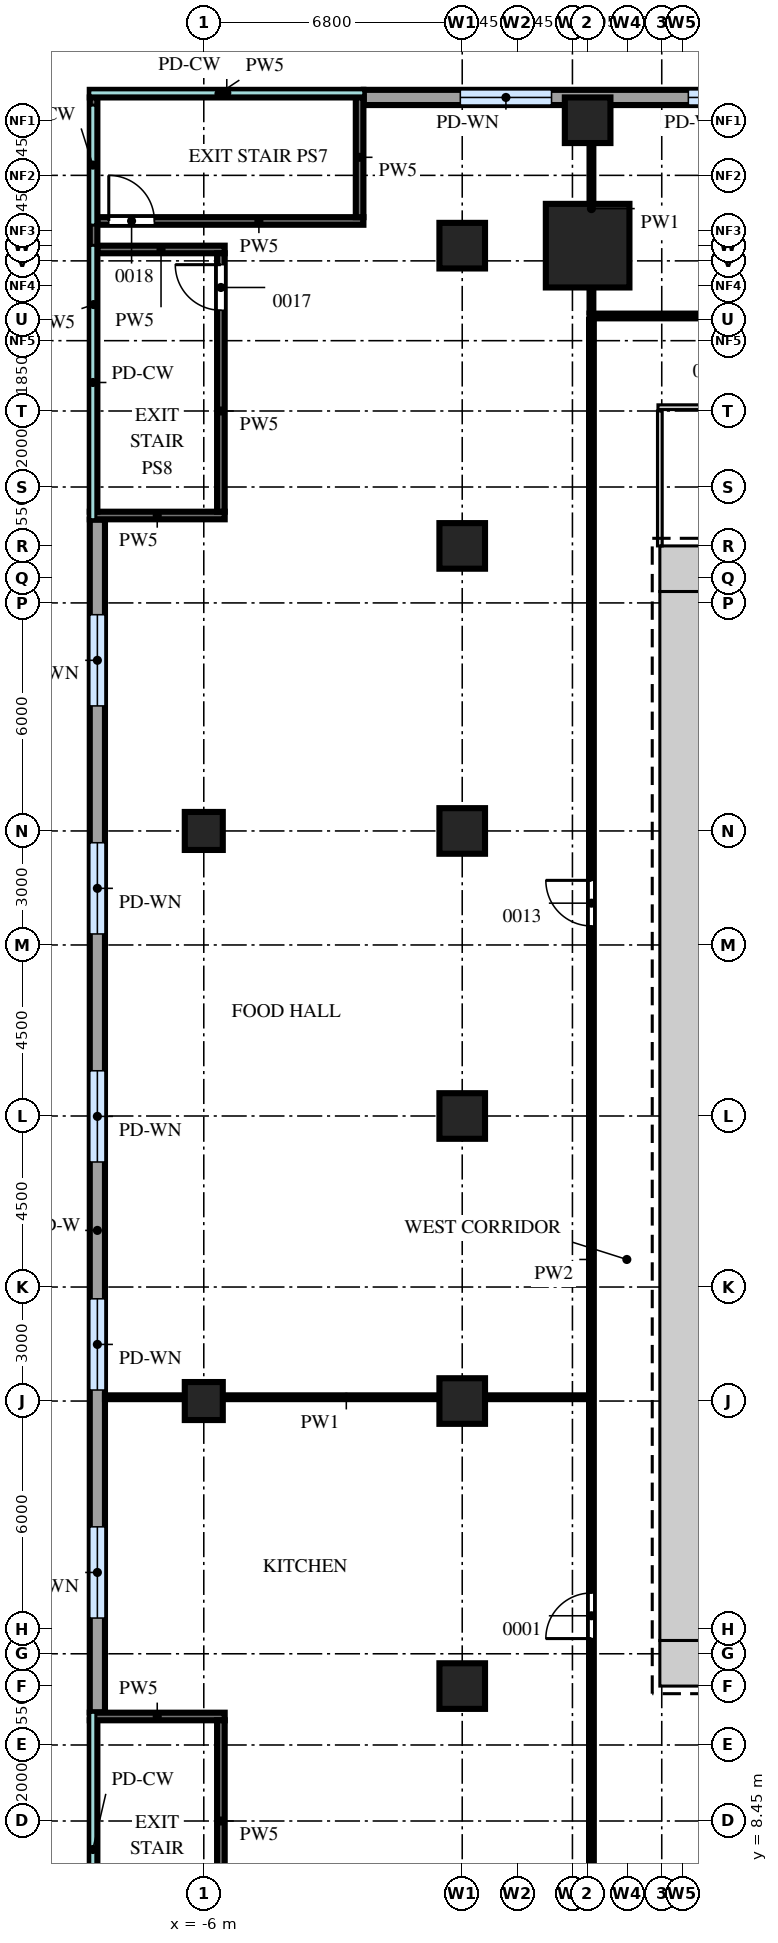
"""IFC4 building model, lengths in metres.
Left out: names, types, materials, properties, quantities, classifications, styles, units other than length and angle.
Written with IfcOpenShell. Run it as: python <this file> out.ifc"""

import sys

from ifc_helpers import new_model, si_unit, direction, frame, frame_2d, origin, origin_2d, place, context, subcontext, project, spatial, rectangle, extrude, source, transform, mapped, element, fill, save


model = new_model("IFC4")
c1 = context("Model", 3, precision=1e-05, world=origin(), true_north=direction((0.0, 1.0)))
c2 = subcontext(c1, "Body", "Model", "MODEL_VIEW")
j1 = project(units=[si_unit("LENGTHUNIT", "METRE"), si_unit("PLANEANGLEUNIT", "RADIAN")], contexts=[c1])
p1 = place(None, origin())
s1 = spatial("IfcSite", under=j1, at=p1, CompositionType="ELEMENT")
p2 = place(p1, origin())
s2 = spatial("IfcBuilding", under=s1, at=p2, CompositionType="ELEMENT")
p3 = place(p2, frame((0.0, 0.0, 13.0)))
s3 = spatial("IfcBuildingStorey", under=s2, at=p3, CompositionType="ELEMENT", Elevation=13.0)
m1 = source(origin(), c2, "Body", "SweptSolid", [
    extrude(rectangle(XDim=1.2, YDim=1.2, at=frame_2d((0.6, 0.0))), origin(), (0.0, 0.0, 1.0), 5.2),
])
for number, where, z_axis, x_axis in (
    (1, (6.0, 41.4, 0.0), (0.0, 0.0, 1.0), (1.0, 0.0, 0.0)),
    (2, (6.0, 12.6, 0.0), (0.0, 0.0, 1.0), (1.0, 0.0, 0.0)),
):
    element("IfcWall", number, at=place(p3, frame(where, z_axis=z_axis, x_axis=x_axis)), inside=s3, PredefinedType="SHEAR", context=c2, shape_type="MappedRepresentation", body=[
        mapped(m1, transform((0.0, 0.0, 0.0))),
    ])
m2 = source(origin(), c2, "Body", "SweptSolid", [
    extrude(rectangle(XDim=27.6, YDim=1.2, at=frame_2d((13.8, 0.0))), origin(), (0.0, 0.0, 1.0), 5.2),
])
p4 = place(p3, frame((6.6, 13.2, 0.0), z_axis=(0.0, 0.0, 1.0), x_axis=(0.0, 1.0, 0.0)))
e3 = element("IfcWall", 3, at=p4, inside=s3, PredefinedType="SHEAR", context=c2, shape_type="MappedRepresentation", body=[
    mapped(m2, transform((0.0, 0.0, 0.0))),
])
m3 = source(origin(), c2, "Body", "SweptSolid", [
    extrude(rectangle(XDim=2.2, YDim=2.2, at=origin_2d()), origin(), (0.0, 0.0, 1.0), 5.2),
])
p5 = place(p3, frame((4.1, 49.9, 0.0), z_axis=(0.0, 0.0, 1.0), x_axis=(1.0, 0.0, 0.0)))
e4 = element("IfcColumn", 4, at=p5, inside=s3, PredefinedType="COLUMN", context=c2, shape_type="MappedRepresentation", body=[
    mapped(m3, transform((0.0, 0.0, 0.0))),
])
m4 = source(origin(), c2, "Body", "SweptSolid", [
    extrude(rectangle(XDim=1.2, YDim=1.2, at=origin_2d()), origin(), (0.0, 0.0, 1.0), 5.2),
])
for number, where, z_axis, x_axis in (
    (5, (4.1, 53.2, 0.0), (0.0, 0.0, 1.0), (1.0, 0.0, 0.0)),
    (6, (0.8, 12.0, 0.0), (0.0, 0.0, 1.0), (1.0, 0.0, 0.0)),
    (7, (0.8, 19.5, 0.0), (0.0, 0.0, 1.0), (1.0, 0.0, 0.0)),
    (8, (0.8, 27.0, 0.0), (0.0, 0.0, 1.0), (1.0, 0.0, 0.0)),
    (9, (0.8, 34.5, 0.0), (0.0, 0.0, 1.0), (1.0, 0.0, 0.0)),
    (10, (0.8, 42.0, 0.0), (0.0, 0.0, 1.0), (1.0, 0.0, 0.0)),
    (11, (0.8, 49.9, 0.0), (0.0, 0.0, 1.0), (1.0, 0.0, 0.0)),
):
    element("IfcColumn", number, at=place(p3, frame(where, z_axis=z_axis, x_axis=x_axis)), inside=s3, PredefinedType="COLUMN", context=c2, shape_type="MappedRepresentation", body=[
        mapped(m4, transform((0.0, 0.0, 0.0))),
    ])
m5 = source(origin(), c2, "Body", "SweptSolid", [
    extrude(rectangle(XDim=1.0, YDim=1.0, at=origin_2d()), origin(), (0.0, 0.0, 1.0), 5.2),
])
for number, where, z_axis, x_axis in (
    (12, (-6.0, 19.5, 0.0), (0.0, 0.0, 1.0), (1.0, 0.0, 0.0)),
    (13, (-6.0, 34.5, 0.0), (0.0, 0.0, 1.0), (1.0, 0.0, 0.0)),
):
    element("IfcColumn", number, at=place(p3, frame(where, z_axis=z_axis, x_axis=x_axis)), inside=s3, PredefinedType="COLUMN", context=c2, shape_type="MappedRepresentation", body=[
        mapped(m5, transform((0.0, 0.0, 0.0))),
    ])
m6 = source(origin(), c2, "Body", "SweptSolid", [
    extrude(rectangle(XDim=31.38, YDim=0.4, at=frame_2d((15.69, 0.0))), origin(), (0.0, 0.0, 1.0), 5.2),
])
p6 = place(p3, frame((-8.8, 42.69, 0.0), z_axis=(0.0, 0.0, 1.0), x_axis=(0.0, -1.0, 0.0)))
e14 = element("IfcWall", 14, at=p6, inside=s3, PredefinedType="SOLIDWALL", context=c2, shape_type="MappedRepresentation", body=[
    mapped(m6, transform((0.0, 0.0, 0.0))),
])
m7 = source(origin(), c2, "Body", "SweptSolid", [
    extrude(rectangle(XDim=2.4, YDim=2.4, at=frame_2d((1.2, 1.2))), frame((0.0, 0.21, 0.0), z_axis=(0.0, -1.0, 0.0), x_axis=(1.0, 0.0, 0.0)), (0.0, 0.0, 1.0), 0.42),
])
p7 = place(p6, frame((2.5, 0.0, 1.0)))
e15 = element("IfcOpeningElement", 15, at=p7, cuts=e14, PredefinedType="OPENING", context=c2, shape_type="MappedRepresentation", body=[
    mapped(m7, transform((0.0, 0.0, 0.0))),
])
p8 = place(p6, frame((8.5, 0.0, 1.0)))
e16 = element("IfcOpeningElement", 16, at=p8, cuts=e14, PredefinedType="OPENING", context=c2, shape_type="MappedRepresentation", body=[
    mapped(m7, transform((0.0, 0.0, 0.0))),
])
p9 = place(p6, frame((14.5, 0.0, 1.0)))
e17 = element("IfcOpeningElement", 17, at=p9, cuts=e14, PredefinedType="OPENING", context=c2, shape_type="MappedRepresentation", body=[
    mapped(m7, transform((0.0, 0.0, 0.0))),
])
p10 = place(p6, frame((20.5, 0.0, 1.0)))
e18 = element("IfcOpeningElement", 18, at=p10, cuts=e14, PredefinedType="OPENING", context=c2, shape_type="MappedRepresentation", body=[
    mapped(m7, transform((0.0, 0.0, 0.0))),
])
p11 = place(p6, frame((26.5, 0.0, 1.0)))
e19 = element("IfcOpeningElement", 19, at=p11, cuts=e14, PredefinedType="OPENING", context=c2, shape_type="MappedRepresentation", body=[
    mapped(m7, transform((0.0, 0.0, 0.0))),
])
m8 = source(origin(), c2, "Body", "SweptSolid", [
    extrude(rectangle(XDim=31.44, YDim=0.4, at=frame_2d((15.72, 0.0))), origin(), (0.0, 0.0, 1.0), 5.2),
])
p12 = place(p3, frame((29.65, 53.8, 0.0), z_axis=(0.0, 0.0, 1.0), x_axis=(-1.0, 0.0, 0.0)))
e20 = element("IfcWall", 20, at=p12, inside=s3, PredefinedType="SOLIDWALL", context=c2, shape_type="MappedRepresentation", body=[
    mapped(m8, transform((0.0, 0.0, 0.0))),
])
p13 = place(p12, frame((20.5, 0.0, 1.0)))
e21 = element("IfcOpeningElement", 21, at=p13, cuts=e20, PredefinedType="OPENING", context=c2, shape_type="MappedRepresentation", body=[
    mapped(m7, transform((0.0, 0.0, 0.0))),
])
p14 = place(p12, frame((26.5, 0.0, 1.0)))
e22 = element("IfcOpeningElement", 22, at=p14, cuts=e20, PredefinedType="OPENING", context=c2, shape_type="MappedRepresentation", body=[
    mapped(m7, transform((0.0, 0.0, 0.0))),
])
m9 = source(origin(), c2, "Body", "SweptSolid", [
    extrude(rectangle(XDim=10.9, YDim=0.2, at=frame_2d((5.45, 0.0))), origin(), (0.0, 0.0, 1.0), 5.2),
])
p15 = place(p3, frame((-8.9, 0.2, 0.0), z_axis=(0.0, 0.0, 1.0), x_axis=(0.0, 1.0, 0.0)))
e23 = element("IfcWall", 23, at=p15, inside=s3, PredefinedType="PARTITIONING", context=c2, shape_type="MappedRepresentation", body=[
    mapped(m9, transform((0.0, 0.0, 0.0))),
])
m10 = source(origin(), c2, "Body", "SweptSolid", [
    extrude(rectangle(XDim=3.55, YDim=0.2, at=frame_2d((1.775, 0.0))), origin(), (0.0, 0.0, 1.0), 5.2),
])
p16 = place(p3, frame((-9.0, 11.2, 0.0), z_axis=(0.0, 0.0, 1.0), x_axis=(1.0, 0.0, 0.0)))
e24 = element("IfcWall", 24, at=p16, inside=s3, PredefinedType="PARTITIONING", context=c2, shape_type="MappedRepresentation", body=[
    mapped(m10, transform((0.0, 0.0, 0.0))),
])
m11 = source(origin(), c2, "Body", "SweptSolid", [
    extrude(rectangle(XDim=6.8, YDim=0.2, at=frame_2d((3.4, 0.0))), origin(), (0.0, 0.0, 1.0), 5.2),
])
p17 = place(p3, frame((-5.55, 4.3, 0.0), z_axis=(0.0, 0.0, 1.0), x_axis=(0.0, 1.0, 0.0)))
e25 = element("IfcWall", 25, at=p17, inside=s3, PredefinedType="PARTITIONING", context=c2, shape_type="MappedRepresentation", body=[
    mapped(m11, transform((0.0, 0.0, 0.0))),
])
m12 = source(origin(), c2, "Body", "SweptSolid", [
    extrude(rectangle(XDim=1.2, YDim=2.1, at=frame_2d((0.6, 1.05))), frame((0.0, 0.11, 0.0), z_axis=(0.0, -1.0, 0.0), x_axis=(1.0, 0.0, 0.0)), (0.0, 0.0, 1.0), 0.22),
])
p18 = place(p17, frame((0.3, 0.0, 0.0)))
e26 = element("IfcOpeningElement", 26, at=p18, cuts=e25, PredefinedType="OPENING", context=c2, shape_type="MappedRepresentation", body=[
    mapped(m12, transform((0.0, 0.0, 0.0))),
])
m13 = source(origin(), c2, "Body", "SweptSolid", [
    extrude(rectangle(XDim=7.0, YDim=0.2, at=frame_2d((3.5, 0.0))), origin(), (0.0, 0.0, 1.0), 5.2),
])
p19 = place(p3, frame((-8.8, 50.55, 0.0), z_axis=(0.0, 0.0, 1.0), x_axis=(1.0, 0.0, 0.0)))
e27 = element("IfcWall", 27, at=p19, inside=s3, PredefinedType="PARTITIONING", context=c2, shape_type="MappedRepresentation", body=[
    mapped(m13, transform((0.0, 0.0, 0.0))),
])
p20 = place(p19, frame((0.3, 0.0, 0.0)))
e28 = element("IfcOpeningElement", 28, at=p20, cuts=e27, PredefinedType="OPENING", context=c2, shape_type="MappedRepresentation", body=[
    mapped(m12, transform((0.0, 0.0, 0.0))),
])
m14 = source(origin(), c2, "Body", "SweptSolid", [
    extrude(rectangle(XDim=7.2, YDim=0.2, at=frame_2d((3.6, 0.0))), origin(), (0.0, 0.0, 1.0), 5.2),
])
p21 = place(p3, frame((-9.0, 53.9, 0.0), z_axis=(0.0, 0.0, 1.0), x_axis=(1.0, 0.0, 0.0)))
e29 = element("IfcWall", 29, at=p21, inside=s3, PredefinedType="PARTITIONING", context=c2, shape_type="MappedRepresentation", body=[
    mapped(m14, transform((0.0, 0.0, 0.0))),
])
m15 = source(origin(), c2, "Body", "SweptSolid", [
    extrude(rectangle(XDim=3.15, YDim=0.2, at=frame_2d((1.575, 0.0))), origin(), (0.0, 0.0, 1.0), 5.2),
])
p22 = place(p3, frame((-1.9, 50.65, 0.0), z_axis=(0.0, 0.0, 1.0), x_axis=(0.0, 1.0, 0.0)))
e30 = element("IfcWall", 30, at=p22, inside=s3, PredefinedType="PARTITIONING", context=c2, shape_type="MappedRepresentation", body=[
    mapped(m15, transform((0.0, 0.0, 0.0))),
])
p23 = place(p3, frame((-9.0, 42.8, 0.0), z_axis=(0.0, 0.0, 1.0), x_axis=(1.0, 0.0, 0.0)))
e31 = element("IfcWall", 31, at=p23, inside=s3, PredefinedType="PARTITIONING", context=c2, shape_type="MappedRepresentation", body=[
    mapped(m10, transform((0.0, 0.0, 0.0))),
])
m16 = source(origin(), c2, "Body", "SweptSolid", [
    extrude(rectangle(XDim=3.35, YDim=0.2, at=frame_2d((1.675, 0.0))), origin(), (0.0, 0.0, 1.0), 5.2),
])
p24 = place(p3, frame((-8.8, 49.8, 0.0), z_axis=(0.0, 0.0, 1.0), x_axis=(1.0, 0.0, 0.0)))
e32 = element("IfcWall", 32, at=p24, inside=s3, PredefinedType="PARTITIONING", context=c2, shape_type="MappedRepresentation", body=[
    mapped(m16, transform((0.0, 0.0, 0.0))),
])
p25 = place(p3, frame((-8.9, 42.9, 0.0), z_axis=(0.0, 0.0, 1.0), x_axis=(0.0, 1.0, 0.0)))
e33 = element("IfcWall", 33, at=p25, inside=s3, PredefinedType="PARTITIONING", context=c2, shape_type="MappedRepresentation", body=[
    mapped(m9, transform((0.0, 0.0, 0.0))),
])
p26 = place(p3, frame((-5.55, 42.9, 0.0), z_axis=(0.0, 0.0, 1.0), x_axis=(0.0, 1.0, 0.0)))
e34 = element("IfcWall", 34, at=p26, inside=s3, PredefinedType="PARTITIONING", context=c2, shape_type="MappedRepresentation", body=[
    mapped(m11, transform((0.0, 0.0, 0.0))),
])
p27 = place(p26, frame((5.3, 0.0, 0.0)))
e35 = element("IfcOpeningElement", 35, at=p27, cuts=e34, PredefinedType="OPENING", context=c2, shape_type="MappedRepresentation", body=[
    mapped(m12, transform((0.0, 0.0, 0.0))),
])
m17 = source(origin(), c2, "Body", "SweptSolid", [
    extrude(rectangle(XDim=41.8, YDim=0.125, at=frame_2d((20.9, 0.0))), origin(), (0.0, 0.0, 1.0), 5.2),
])
p28 = place(p3, frame((4.2, 6.15, 0.0), z_axis=(0.0, 0.0, 1.0), x_axis=(0.0, 1.0, 0.0)))
e36 = element("IfcWall", 36, at=p28, inside=s3, PredefinedType="PARTITIONING", context=c2, shape_type="MappedRepresentation", body=[
    mapped(m17, transform((0.0, 0.0, 0.0))),
])
m18 = source(origin(), c2, "Body", "SweptSolid", [
    extrude(rectangle(XDim=1.2, YDim=2.1, at=frame_2d((0.6, 1.05))), frame((0.0, 0.073, 0.0), z_axis=(0.0, -1.0, 0.0), x_axis=(1.0, 0.0, 0.0)), (0.0, 0.0, 1.0), 0.145),
])
p29 = place(p28, frame((7.1, 0.0, 0.0)))
e37 = element("IfcOpeningElement", 37, at=p29, cuts=e36, PredefinedType="OPENING", context=c2, shape_type="MappedRepresentation", body=[
    mapped(m18, transform((0.0, 0.0, 0.0))),
])
p30 = place(p28, frame((25.85, 0.0, 0.0)))
e38 = element("IfcOpeningElement", 38, at=p30, cuts=e36, PredefinedType="OPENING", context=c2, shape_type="MappedRepresentation", body=[
    mapped(m18, transform((0.0, 0.0, 0.0))),
])
m19 = source(origin(), c2, "Body", "SweptSolid", [
    extrude(rectangle(XDim=12.7, YDim=0.1, at=frame_2d((6.35, 0.0))), origin(), (0.0, 0.0, 1.0), 5.2),
])
p31 = place(p3, frame((-8.6, 19.6, 0.0), z_axis=(0.0, 0.0, 1.0), x_axis=(1.0, 0.0, 0.0)))
e39 = element("IfcWall", 39, at=p31, inside=s3, PredefinedType="PARTITIONING", context=c2, shape_type="MappedRepresentation", body=[
    mapped(m19, transform((0.0, 0.0, 0.0))),
])
m20 = source(origin(), c2, "Body", "SweptSolid", [
    extrude(rectangle(XDim=3.55, YDim=0.125, at=frame_2d((1.775, 0.0))), origin(), (0.0, 0.0, 1.0), 5.2),
])
p32 = place(p3, frame((6.0, 42.0, 0.0), z_axis=(0.0, 0.0, 1.0), x_axis=(0.0, 1.0, 0.0)))
e40 = element("IfcWall", 40, at=p32, inside=s3, PredefinedType="PARTITIONING", context=c2, shape_type="MappedRepresentation", body=[
    mapped(m20, transform((0.0, 0.0, 0.0))),
])
m21 = source(origin(), c2, "Body", "SweptSolid", [
    extrude(rectangle(XDim=7.95, YDim=0.125, at=frame_2d((3.975, 0.0))), origin(), (0.0, 0.0, 1.0), 5.2),
])
p33 = place(p3, frame((5.95, 45.65, 0.0), z_axis=(0.0, 0.0, 1.0), x_axis=(1.0, 0.0, 0.0)))
e41 = element("IfcWall", 41, at=p33, inside=s3, PredefinedType="PARTITIONING", context=c2, shape_type="MappedRepresentation", body=[
    mapped(m21, transform((0.0, 0.0, 0.0))),
])
m22 = source(origin(), c2, "Body", "SweptSolid", [
    extrude(rectangle(XDim=0.9, YDim=2.1, at=frame_2d((0.45, 1.05))), frame((0.0, 0.073, 0.0), z_axis=(0.0, -1.0, 0.0), x_axis=(1.0, 0.0, 0.0)), (0.0, 0.0, 1.0), 0.145),
])
p34 = place(p33, frame((3.55, 0.0, 0.0)))
e42 = element("IfcOpeningElement", 42, at=p34, cuts=e41, PredefinedType="OPENING", context=c2, shape_type="MappedRepresentation", body=[
    mapped(m22, transform((0.0, 0.0, 0.0))),
])
m23 = source(origin(), c2, "Body", "SweptSolid", [
    extrude(rectangle(XDim=25.5, YDim=0.125, at=frame_2d((12.75, 0.0))), origin(), (0.0, 0.0, 1.0), 5.2),
])
p35 = place(p3, frame((4.15, 48.05, 0.0), z_axis=(0.0, 0.0, 1.0), x_axis=(1.0, 0.0, 0.0)))
e43 = element("IfcWall", 43, at=p35, inside=s3, PredefinedType="PARTITIONING", context=c2, shape_type="MappedRepresentation", body=[
    mapped(m23, transform((0.0, 0.0, 0.0))),
])
p36 = place(p35, frame((3.5, 0.0, 0.0)))
e44 = element("IfcOpeningElement", 44, at=p36, cuts=e43, PredefinedType="OPENING", context=c2, shape_type="MappedRepresentation", body=[
    mapped(m22, transform((0.0, 0.0, 0.0))),
])
p37 = place(p35, frame((11.0, 0.0, 0.0)))
e45 = element("IfcOpeningElement", 45, at=p37, cuts=e43, PredefinedType="OPENING", context=c2, shape_type="MappedRepresentation", body=[
    mapped(m22, transform((0.0, 0.0, 0.0))),
])
m24 = source(origin(), c2, "Body", "SweptSolid", [
    extrude(rectangle(XDim=1.0, YDim=2.1, at=frame_2d((0.5, 1.05))), frame((0.0, 0.073, 0.0), z_axis=(0.0, -1.0, 0.0), x_axis=(1.0, 0.0, 0.0)), (0.0, 0.0, 1.0), 0.145),
])
p38 = place(p35, frame((17.1, 0.0, 0.0)))
e46 = element("IfcOpeningElement", 46, at=p38, cuts=e43, PredefinedType="OPENING", context=c2, shape_type="MappedRepresentation", body=[
    mapped(m24, transform((0.0, 0.0, 0.0))),
])
p39 = place(p35, frame((22.3, 0.0, 0.0)))
e47 = element("IfcOpeningElement", 47, at=p39, cuts=e43, PredefinedType="OPENING", context=c2, shape_type="MappedRepresentation", body=[
    mapped(m22, transform((0.0, 0.0, 0.0))),
])
m25 = source(origin(), c2, "Body", "SweptSolid", [
    extrude(rectangle(XDim=5.45, YDim=0.1, at=frame_2d((2.725, 0.0))), origin(), (0.0, 0.0, 1.0), 5.2),
])
p40 = place(p3, frame((4.2, 48.15, 0.0), z_axis=(0.0, 0.0, 1.0), x_axis=(0.0, 1.0, 0.0)))
e48 = element("IfcWall", 48, at=p40, inside=s3, PredefinedType="PARTITIONING", context=c2, shape_type="MappedRepresentation", body=[
    mapped(m25, transform((0.0, 0.0, 0.0))),
])
m26 = source(origin(), c2, "Body", "SweptSolid", [
    extrude(rectangle(XDim=2.4, YDim=2.4, at=frame_2d((1.2, 1.2))), frame((0.0, 0.03, 0.0), z_axis=(0.0, -1.0, 0.0), x_axis=(1.0, 0.0, 0.0)), (0.0, 0.0, 1.0), 0.06),
])
p41 = place(p7, origin())
e49 = element("IfcWindow", 49, at=p41, inside=s3, PartitioningType="SINGLE_PANEL", PredefinedType="WINDOW", context=c2, shape_type="MappedRepresentation", body=[
    mapped(m26, transform((0.0, 0.0, 0.0))),
])
fill(e15, e49)
p42 = place(p8, origin())
e50 = element("IfcWindow", 50, at=p42, inside=s3, PartitioningType="SINGLE_PANEL", PredefinedType="WINDOW", context=c2, shape_type="MappedRepresentation", body=[
    mapped(m26, transform((0.0, 0.0, 0.0))),
])
fill(e16, e50)
p43 = place(p9, origin())
e51 = element("IfcWindow", 51, at=p43, inside=s3, PartitioningType="SINGLE_PANEL", PredefinedType="WINDOW", context=c2, shape_type="MappedRepresentation", body=[
    mapped(m26, transform((0.0, 0.0, 0.0))),
])
fill(e17, e51)
p44 = place(p10, origin())
e52 = element("IfcWindow", 52, at=p44, inside=s3, PartitioningType="SINGLE_PANEL", PredefinedType="WINDOW", context=c2, shape_type="MappedRepresentation", body=[
    mapped(m26, transform((0.0, 0.0, 0.0))),
])
fill(e18, e52)
p45 = place(p11, origin())
e53 = element("IfcWindow", 53, at=p45, inside=s3, PartitioningType="SINGLE_PANEL", PredefinedType="WINDOW", context=c2, shape_type="MappedRepresentation", body=[
    mapped(m26, transform((0.0, 0.0, 0.0))),
])
fill(e19, e53)
p46 = place(p13, origin())
e54 = element("IfcWindow", 54, at=p46, inside=s3, PartitioningType="SINGLE_PANEL", PredefinedType="WINDOW", context=c2, shape_type="MappedRepresentation", body=[
    mapped(m26, transform((0.0, 0.0, 0.0))),
])
fill(e21, e54)
p47 = place(p14, origin())
e55 = element("IfcWindow", 55, at=p47, inside=s3, PartitioningType="SINGLE_PANEL", PredefinedType="WINDOW", context=c2, shape_type="MappedRepresentation", body=[
    mapped(m26, transform((0.0, 0.0, 0.0))),
])
fill(e22, e55)
m27 = source(origin(), c2, "Body", "SweptSolid", [
    extrude(rectangle(XDim=1.2, YDim=2.1, at=frame_2d((0.6, 1.05))), frame((0.0, 0.025, 0.0), z_axis=(0.0, -1.0, 0.0), x_axis=(1.0, 0.0, 0.0)), (0.0, 0.0, 1.0), 0.05),
])
p48 = place(p29, origin())
e56 = element("IfcDoor", 56, at=p48, inside=s3, OperationType="SINGLE_SWING_RIGHT", PredefinedType="DOOR", context=c2, shape_type="MappedRepresentation", body=[
    mapped(m27, transform((0.0, 0.0, 0.0))),
])
fill(e37, e56)
p49 = place(p30, origin())
e57 = element("IfcDoor", 57, at=p49, inside=s3, OperationType="SINGLE_SWING_LEFT", PredefinedType="DOOR", context=c2, shape_type="MappedRepresentation", body=[
    mapped(m27, transform((0.0, 0.0, 0.0))),
])
fill(e38, e57)
p50 = place(p20, origin())
e58 = element("IfcDoor", 58, at=p50, inside=s3, OperationType="SINGLE_SWING_RIGHT", PredefinedType="DOOR", context=c2, shape_type="MappedRepresentation", body=[
    mapped(m27, transform((0.0, 0.0, 0.0))),
])
fill(e28, e58)
p51 = place(p27, origin())
e59 = element("IfcDoor", 59, at=p51, inside=s3, OperationType="SINGLE_SWING_LEFT", PredefinedType="DOOR", context=c2, shape_type="MappedRepresentation", body=[
    mapped(m27, transform((0.0, 0.0, 0.0))),
])
fill(e35, e59)
save(model, sys.argv[1])
